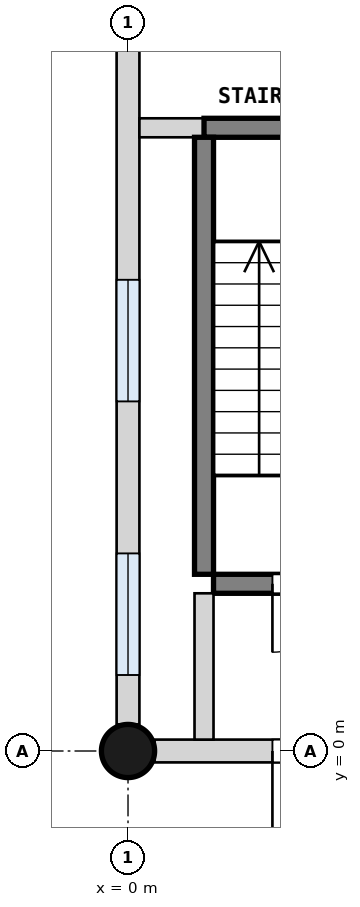
"""IFC4 building model, lengths in metres.
Left out: names, types, materials, properties, quantities, classifications, styles, units other than length and angle.
Written with IfcOpenShell. Run it as: python <this file> out.ifc"""

import sys

from ifc_helpers import new_model, si_unit, direction, frame, frame_2d, origin, origin_with_axes, origin_2d, place, context, subcontext, project, spatial, rectangle, circle, extrude, element, fill, save


model = new_model("IFC4")
c1 = context("Model", 3, precision=1e-05, world=origin(), true_north=direction((0.0, 1.0)))
c2 = subcontext(c1, "Body", "Model", "MODEL_VIEW")
j1 = project(units=[si_unit("LENGTHUNIT", "METRE"), si_unit("PLANEANGLEUNIT", "RADIAN")], contexts=[c1])
p1 = place(None, origin())
s1 = spatial("IfcSite", under=j1, at=p1, CompositionType="ELEMENT")
p2 = place(p1, origin())
s2 = spatial("IfcBuilding", under=s1, at=p2, CompositionType="ELEMENT")
p3 = place(p2, origin())
s3 = spatial("IfcBuildingStorey", under=s2, at=p3, CompositionType="ELEMENT", Elevation=0.0)
p4 = place(p3, origin_with_axes())
e1 = element("IfcColumn", 1, at=p4, inside=s3, PredefinedType="COLUMN", context=c2, shape_type="SweptSolid", body=[
    extrude(circle(Radius=0.35, at=origin_2d()), origin(), (0.0, 0.0, 1.0), 4.2),
])
p5 = place(p3, frame((0.35, 0.0, 0.0), z_axis=(0.0, 0.0, 1.0), x_axis=(1.0, 0.0, 0.0)))
e2 = element("IfcWall", 2, at=p5, inside=s3, PredefinedType="SOLIDWALL", context=c2, shape_type="SweptSolid", body=[
    extrude(rectangle(XDim=4.25, YDim=0.3, at=frame_2d((2.125, 0.0))), origin(), (0.0, 0.0, 1.0), 3.0),
])
p6 = place(p5, frame((1.55, 0.0, 0.0)))
e3 = element("IfcOpeningElement", 3, at=p6, cuts=e2, PredefinedType="OPENING", context=c2, shape_type="SweptSolid", body=[
    extrude(rectangle(XDim=1.8, YDim=2.1, at=frame_2d((0.9, 1.05))), frame((0.0, 0.16, 0.0), z_axis=(0.0, -1.0, 0.0), x_axis=(1.0, 0.0, 0.0)), (0.0, 0.0, 1.0), 0.32),
])
p7 = place(p3, frame((0.0, 0.35, 0.0), z_axis=(0.0, 0.0, 1.0), x_axis=(0.0, 1.0, 0.0)))
e4 = element("IfcWall", 4, at=p7, inside=s3, PredefinedType="SOLIDWALL", context=c2, shape_type="SweptSolid", body=[
    extrude(rectangle(XDim=13.7, YDim=0.3, at=frame_2d((6.85, 0.0))), origin(), (0.0, 0.0, 1.0), 3.0),
])
p8 = place(p7, frame((0.65, 0.0, 0.3)))
e5 = element("IfcOpeningElement", 5, at=p8, cuts=e4, PredefinedType="OPENING", context=c2, shape_type="SweptSolid", body=[
    extrude(rectangle(XDim=1.6, YDim=2.4, at=frame_2d((0.8, 1.2))), frame((0.0, 0.16, 0.0), z_axis=(0.0, -1.0, 0.0), x_axis=(1.0, 0.0, 0.0)), (0.0, 0.0, 1.0), 0.32),
])
p9 = place(p7, frame((4.25, 0.0, 0.3)))
e6 = element("IfcOpeningElement", 6, at=p9, cuts=e4, PredefinedType="OPENING", context=c2, shape_type="SweptSolid", body=[
    extrude(rectangle(XDim=1.6, YDim=2.4, at=frame_2d((0.8, 1.2))), frame((0.0, 0.16, 0.0), z_axis=(0.0, -1.0, 0.0), x_axis=(1.0, 0.0, 0.0)), (0.0, 0.0, 1.0), 0.32),
])
p10 = place(p7, frame((11.45, 0.0, 0.3)))
e7 = element("IfcOpeningElement", 7, at=p10, cuts=e4, PredefinedType="OPENING", context=c2, shape_type="SweptSolid", body=[
    extrude(rectangle(XDim=1.6, YDim=2.4, at=frame_2d((0.8, 1.2))), frame((0.0, 0.16, 0.0), z_axis=(0.0, -1.0, 0.0), x_axis=(1.0, 0.0, 0.0)), (0.0, 0.0, 1.0), 0.32),
])
p11 = place(p3, frame((1.125, 2.2, 0.0), z_axis=(0.0, 0.0, 1.0), x_axis=(1.0, 0.0, 0.0)))
e8 = element("IfcWall", 8, at=p11, inside=s3, PredefinedType="SHEAR", context=c2, shape_type="SweptSolid", body=[
    extrude(rectangle(XDim=3.35, YDim=0.25, at=frame_2d((1.675, 0.0))), origin(), (0.0, 0.0, 1.0), 3.9),
])
p12 = place(p11, frame((0.775, 0.0, 0.0)))
e9 = element("IfcOpeningElement", 9, at=p12, cuts=e8, PredefinedType="OPENING", context=c2, shape_type="SweptSolid", body=[
    extrude(rectangle(XDim=1.8, YDim=2.1, at=frame_2d((0.9, 1.05))), frame((0.0, 0.135, 0.0), z_axis=(0.0, -1.0, 0.0), x_axis=(1.0, 0.0, 0.0)), (0.0, 0.0, 1.0), 0.27),
])
p13 = place(p3, frame((0.15, 8.2, 0.0), z_axis=(0.0, 0.0, 1.0), x_axis=(1.0, 0.0, 0.0)))
e10 = element("IfcWall", 10, at=p13, inside=s3, PredefinedType="PARTITIONING", context=c2, shape_type="SweptSolid", body=[
    extrude(rectangle(XDim=0.85, YDim=0.25, at=frame_2d((0.425, 0.0))), origin(), (0.0, 0.0, 1.0), 3.9),
])
p14 = place(p3, frame((1.0, 8.2, 0.0), z_axis=(0.0, 0.0, 1.0), x_axis=(1.0, 0.0, 0.0)))
e11 = element("IfcWall", 11, at=p14, inside=s3, PredefinedType="SHEAR", context=c2, shape_type="SweptSolid", body=[
    extrude(rectangle(XDim=3.61, YDim=0.25, at=frame_2d((1.805, 0.0))), origin(), (0.0, 0.0, 1.0), 3.9),
])
p15 = place(p3, frame((1.0, 0.15, 0.0), z_axis=(0.0, 0.0, 1.0), x_axis=(0.0, 1.0, 0.0)))
e12 = element("IfcWall", 12, at=p15, inside=s3, PredefinedType="PARTITIONING", context=c2, shape_type="SweptSolid", body=[
    extrude(rectangle(XDim=1.925, YDim=0.25, at=frame_2d((0.962, 0.0))), origin(), (0.0, 0.0, 1.0), 3.9),
])
p16 = place(p3, frame((1.0, 2.325, 0.0), z_axis=(0.0, 0.0, 1.0), x_axis=(0.0, 1.0, 0.0)))
e13 = element("IfcWall", 13, at=p16, inside=s3, PredefinedType="SHEAR", context=c2, shape_type="SweptSolid", body=[
    extrude(rectangle(XDim=5.75, YDim=0.25, at=frame_2d((2.875, 0.0))), origin(), (0.0, 0.0, 1.0), 3.9),
])
p17 = place(p6, frame((1.8, 0.0, 0.0), z_axis=(0.0, 0.0, 1.0), x_axis=(-1.0, 0.0, 0.0)))
e14 = element("IfcDoor", 14, at=p17, inside=s3, OperationType="SINGLE_SWING_RIGHT", PredefinedType="DOOR", context=c2, shape_type="SweptSolid", body=[
    extrude(rectangle(XDim=1.8, YDim=2.1, at=frame_2d((0.9, 1.05))), frame((0.0, 0.025, 0.0), z_axis=(0.0, -1.0, 0.0), x_axis=(1.0, 0.0, 0.0)), (0.0, 0.0, 1.0), 0.05),
])
fill(e3, e14)
p18 = place(p12, frame((1.8, 0.0, 0.0), z_axis=(0.0, 0.0, 1.0), x_axis=(-1.0, 0.0, 0.0)))
e15 = element("IfcDoor", 15, at=p18, inside=s3, OperationType="DOUBLE_DOOR_SINGLE_SWING", PredefinedType="DOOR", context=c2, shape_type="SweptSolid", body=[
    extrude(rectangle(XDim=1.8, YDim=2.1, at=frame_2d((0.9, 1.05))), frame((0.0, 0.025, 0.0), z_axis=(0.0, -1.0, 0.0), x_axis=(1.0, 0.0, 0.0)), (0.0, 0.0, 1.0), 0.05),
])
fill(e9, e15)
p19 = place(p8, origin())
e16 = element("IfcWindow", 16, at=p19, inside=s3, PartitioningType="SINGLE_PANEL", PredefinedType="WINDOW", context=c2, shape_type="SweptSolid", body=[
    extrude(rectangle(XDim=1.6, YDim=2.4, at=frame_2d((0.8, 1.2))), frame((0.0, 0.03, 0.0), z_axis=(0.0, -1.0, 0.0), x_axis=(1.0, 0.0, 0.0)), (0.0, 0.0, 1.0), 0.06),
])
fill(e5, e16)
p20 = place(p9, origin())
e17 = element("IfcWindow", 17, at=p20, inside=s3, PartitioningType="SINGLE_PANEL", PredefinedType="WINDOW", context=c2, shape_type="SweptSolid", body=[
    extrude(rectangle(XDim=1.6, YDim=2.4, at=frame_2d((0.8, 1.2))), frame((0.0, 0.03, 0.0), z_axis=(0.0, -1.0, 0.0), x_axis=(1.0, 0.0, 0.0)), (0.0, 0.0, 1.0), 0.06),
])
fill(e6, e17)
save(model, sys.argv[1])
